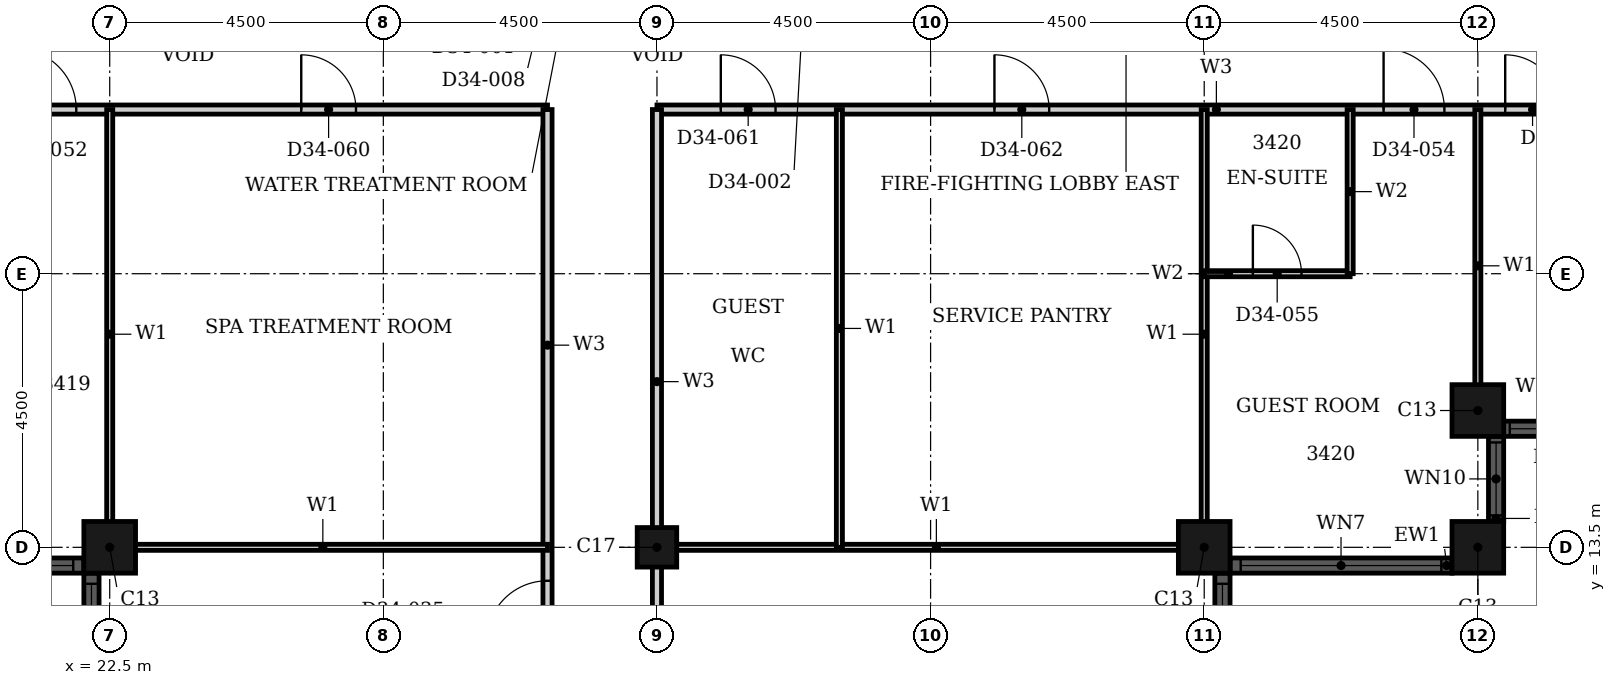
"""IFC4 building model, lengths in metres.
Left out: names, types, materials, properties, quantities, classifications, styles, units other than length and angle.
Written with IfcOpenShell. Run it as: python <this file> out.ifc"""

import sys

from ifc_helpers import new_model, si_unit, direction, frame, frame_2d, origin, origin_2d, place, context, subcontext, project, spatial, rectangle, hollow_rectangle, extrude, element, fill, save


model = new_model("IFC4")
c1 = context("Model", 3, precision=1e-05, world=origin(), true_north=direction((0.0, 1.0)))
c2 = subcontext(c1, "Body", "Model", "MODEL_VIEW")
j1 = project(units=[si_unit("LENGTHUNIT", "METRE"), si_unit("PLANEANGLEUNIT", "RADIAN")], contexts=[c1])
p1 = place(None, origin())
s1 = spatial("IfcSite", under=j1, at=p1, CompositionType="ELEMENT")
p2 = place(p1, origin())
s2 = spatial("IfcBuilding", under=s1, at=p2, CompositionType="ELEMENT")
p3 = place(p2, frame((0.0, 0.0, 136.8)))
s3 = spatial("IfcBuildingStorey", under=s2, at=p3, CompositionType="ELEMENT", Elevation=136.8)
for number, where, z_axis, x_axis in (
    (1, (40.5, 13.5, 0.0), (0.0, 0.0, 1.0), (1.0, 0.0, 0.0)),
    (2, (45.0, 13.5, 0.0), (0.0, 0.0, 1.0), (1.0, 0.0, 0.0)),
    (3, (45.0, 15.75, 0.0), (0.0, 0.0, 1.0), (1.0, 0.0, 0.0)),
    (4, (22.5, 13.5, 0.0), (0.0, 0.0, 1.0), (1.0, 0.0, 0.0)),
):
    element("IfcColumn", number, at=place(p3, frame(where, z_axis=z_axis, x_axis=x_axis)), inside=s3, PredefinedType="COLUMN", context=c2, shape_type="SweptSolid", body=[
        extrude(hollow_rectangle(XDim=0.85, YDim=0.85, WallThickness=0.026, at=origin_2d()), origin(), (0.0, 0.0, 1.0), 3.6),
    ])
p4 = place(p3, frame((31.5, 13.5, 0.0), z_axis=(0.0, 0.0, 1.0), x_axis=(1.0, 0.0, 0.0)))
e5 = element("IfcColumn", 5, at=p4, inside=s3, PredefinedType="COLUMN", context=c2, shape_type="SweptSolid", body=[
    extrude(hollow_rectangle(XDim=0.65, YDim=0.65, WallThickness=0.021, at=origin_2d()), origin(), (0.0, 0.0, 1.0), 3.6),
])
p5 = place(p3, frame((40.8, 4.925, 0.0), z_axis=(0.0, 0.0, 1.0), x_axis=(0.0, 1.0, 0.0)))
e6 = element("IfcWall", 6, at=p5, inside=s3, PredefinedType="SOLIDWALL", context=c2, shape_type="SweptSolid", body=[
    extrude(rectangle(XDim=8.15, YDim=0.25, at=frame_2d((4.075, 0.0))), origin(), (0.0, 0.0, 1.0), 3.6),
])
p6 = place(p5, frame((0.175, 0.0, 0.9)))
e7 = element("IfcOpeningElement", 7, at=p6, cuts=e6, PredefinedType="OPENING", context=c2, shape_type="SweptSolid", body=[
    extrude(rectangle(XDim=3.3, YDim=1.85, at=frame_2d((1.65, 0.925))), frame((0.0, 0.135, 0.0), z_axis=(0.0, -1.0, 0.0), x_axis=(1.0, 0.0, 0.0)), (0.0, 0.0, 1.0), 0.27),
])
p7 = place(p5, frame((4.675, 0.0, 0.9)))
e8 = element("IfcOpeningElement", 8, at=p7, cuts=e6, PredefinedType="OPENING", context=c2, shape_type="SweptSolid", body=[
    extrude(rectangle(XDim=3.3, YDim=1.85, at=frame_2d((1.65, 0.925))), frame((0.0, 0.135, 0.0), z_axis=(0.0, -1.0, 0.0), x_axis=(1.0, 0.0, 0.0)), (0.0, 0.0, 1.0), 0.27),
])
p8 = place(p3, frame((40.925, 13.2, 0.0), z_axis=(0.0, 0.0, 1.0), x_axis=(1.0, 0.0, 0.0)))
e9 = element("IfcWall", 9, at=p8, inside=s3, PredefinedType="SOLIDWALL", context=c2, shape_type="SweptSolid", body=[
    extrude(rectangle(XDim=3.65, YDim=0.25, at=frame_2d((1.825, 0.0))), origin(), (0.0, 0.0, 1.0), 3.6),
])
p9 = place(p8, frame((0.175, 0.0, 0.9)))
e10 = element("IfcOpeningElement", 10, at=p9, cuts=e9, PredefinedType="OPENING", context=c2, shape_type="SweptSolid", body=[
    extrude(rectangle(XDim=3.3, YDim=1.85, at=frame_2d((1.65, 0.925))), frame((0.0, 0.135, 0.0), z_axis=(0.0, -1.0, 0.0), x_axis=(1.0, 0.0, 0.0)), (0.0, 0.0, 1.0), 0.27),
])
p10 = place(p3, frame((45.3, 13.925, 0.0), z_axis=(0.0, 0.0, 1.0), x_axis=(0.0, 1.0, 0.0)))
e11 = element("IfcWall", 11, at=p10, inside=s3, PredefinedType="SOLIDWALL", context=c2, shape_type="SweptSolid", body=[
    extrude(rectangle(XDim=1.4, YDim=0.25, at=frame_2d((0.7, 0.0))), origin(), (0.0, 0.0, 1.0), 3.6),
])
p11 = place(p10, frame((0.1, 0.0, 0.9)))
e12 = element("IfcOpeningElement", 12, at=p11, cuts=e11, PredefinedType="OPENING", context=c2, shape_type="SweptSolid", body=[
    extrude(rectangle(XDim=1.2, YDim=1.85, at=frame_2d((0.6, 0.925))), frame((0.0, 0.135, 0.0), z_axis=(0.0, -1.0, 0.0), x_axis=(1.0, 0.0, 0.0)), (0.0, 0.0, 1.0), 0.27),
])
p12 = place(p3, frame((45.425, 15.45, 0.0), z_axis=(0.0, 0.0, 1.0), x_axis=(1.0, 0.0, 0.0)))
e13 = element("IfcWall", 13, at=p12, inside=s3, PredefinedType="SOLIDWALL", context=c2, shape_type="SweptSolid", body=[
    extrude(rectangle(XDim=1.4, YDim=0.25, at=frame_2d((0.7, 0.0))), origin(), (0.0, 0.0, 1.0), 3.6),
])
p13 = place(p12, frame((0.1, 0.0, 0.9)))
e14 = element("IfcOpeningElement", 14, at=p13, cuts=e13, PredefinedType="OPENING", context=c2, shape_type="SweptSolid", body=[
    extrude(rectangle(XDim=1.2, YDim=1.85, at=frame_2d((0.6, 0.925))), frame((0.0, 0.135, 0.0), z_axis=(0.0, -1.0, 0.0), x_axis=(1.0, 0.0, 0.0)), (0.0, 0.0, 1.0), 0.27),
])
p14 = place(p3, frame((18.425, 13.2, 0.0), z_axis=(0.0, 0.0, 1.0), x_axis=(1.0, 0.0, 0.0)))
e15 = element("IfcWall", 15, at=p14, inside=s3, PredefinedType="SOLIDWALL", context=c2, shape_type="SweptSolid", body=[
    extrude(rectangle(XDim=3.65, YDim=0.25, at=frame_2d((1.825, 0.0))), origin(), (0.0, 0.0, 1.0), 3.6),
])
p15 = place(p14, frame((0.175, 0.0, 0.9)))
e16 = element("IfcOpeningElement", 16, at=p15, cuts=e15, PredefinedType="OPENING", context=c2, shape_type="SweptSolid", body=[
    extrude(rectangle(XDim=3.3, YDim=1.85, at=frame_2d((1.65, 0.925))), frame((0.0, 0.135, 0.0), z_axis=(0.0, -1.0, 0.0), x_axis=(1.0, 0.0, 0.0)), (0.0, 0.0, 1.0), 0.27),
])
p16 = place(p3, frame((22.2, 13.075, 0.0), z_axis=(0.0, 0.0, 1.0), x_axis=(0.0, -1.0, 0.0)))
e17 = element("IfcWall", 17, at=p16, inside=s3, PredefinedType="SOLIDWALL", context=c2, shape_type="SweptSolid", body=[
    extrude(rectangle(XDim=8.15, YDim=0.25, at=frame_2d((4.075, 0.0))), origin(), (0.0, 0.0, 1.0), 3.6),
])
p17 = place(p16, frame((0.175, 0.0, 0.9)))
e18 = element("IfcOpeningElement", 18, at=p17, cuts=e17, PredefinedType="OPENING", context=c2, shape_type="SweptSolid", body=[
    extrude(rectangle(XDim=3.3, YDim=1.85, at=frame_2d((1.65, 0.925))), frame((0.0, 0.135, 0.0), z_axis=(0.0, -1.0, 0.0), x_axis=(1.0, 0.0, 0.0)), (0.0, 0.0, 1.0), 0.27),
])
p18 = place(p16, frame((4.675, 0.0, 0.9)))
e19 = element("IfcOpeningElement", 19, at=p18, cuts=e17, PredefinedType="OPENING", context=c2, shape_type="SweptSolid", body=[
    extrude(rectangle(XDim=3.3, YDim=1.85, at=frame_2d((1.65, 0.925))), frame((0.0, 0.135, 0.0), z_axis=(0.0, -1.0, 0.0), x_axis=(1.0, 0.0, 0.0)), (0.0, 0.0, 1.0), 0.27),
])
p19 = place(p3, frame((16.2, 20.7, 0.0), z_axis=(0.0, 0.0, 1.0), x_axis=(1.0, 0.0, 0.0)))
e20 = element("IfcWall", 20, at=p19, inside=s3, PredefinedType="PARTITIONING", context=c2, shape_type="SweptSolid", body=[
    extrude(rectangle(XDim=13.5, YDim=0.15, at=frame_2d((6.75, 0.0))), origin(), (0.0, 0.0, 1.0), 3.2),
])
p20 = place(p19, frame((4.75, 0.0, 0.0)))
e21 = element("IfcOpeningElement", 21, at=p20, cuts=e20, PredefinedType="OPENING", context=c2, shape_type="SweptSolid", body=[
    extrude(rectangle(XDim=1.0, YDim=2.1, at=frame_2d((0.5, 1.05))), frame((0.0, 0.085, 0.0), z_axis=(0.0, -1.0, 0.0), x_axis=(1.0, 0.0, 0.0)), (0.0, 0.0, 1.0), 0.17),
])
p21 = place(p19, frame((9.45, 0.0, 0.0)))
e22 = element("IfcOpeningElement", 22, at=p21, cuts=e20, PredefinedType="OPENING", context=c2, shape_type="SweptSolid", body=[
    extrude(rectangle(XDim=0.9, YDim=2.1, at=frame_2d((0.45, 1.05))), frame((0.0, 0.085, 0.0), z_axis=(0.0, -1.0, 0.0), x_axis=(1.0, 0.0, 0.0)), (0.0, 0.0, 1.0), 0.17),
])
p22 = place(p3, frame((31.5, 20.7, 0.0), z_axis=(0.0, 0.0, 1.0), x_axis=(1.0, 0.0, 0.0)))
e23 = element("IfcWall", 23, at=p22, inside=s3, PredefinedType="PARTITIONING", context=c2, shape_type="SweptSolid", body=[
    extrude(rectangle(XDim=15.3, YDim=0.15, at=frame_2d((7.65, 0.0))), origin(), (0.0, 0.0, 1.0), 3.2),
])
p23 = place(p22, frame((11.95, 0.0, 0.0)))
e24 = element("IfcOpeningElement", 24, at=p23, cuts=e23, PredefinedType="OPENING", context=c2, shape_type="SweptSolid", body=[
    extrude(rectangle(XDim=1.0, YDim=2.1, at=frame_2d((0.5, 1.05))), frame((0.0, 0.085, 0.0), z_axis=(0.0, -1.0, 0.0), x_axis=(1.0, 0.0, 0.0)), (0.0, 0.0, 1.0), 0.17),
])
p24 = place(p22, frame((13.95, 0.0, 0.0)))
e25 = element("IfcOpeningElement", 25, at=p24, cuts=e23, PredefinedType="OPENING", context=c2, shape_type="SweptSolid", body=[
    extrude(rectangle(XDim=0.9, YDim=2.1, at=frame_2d((0.45, 1.05))), frame((0.0, 0.085, 0.0), z_axis=(0.0, -1.0, 0.0), x_axis=(1.0, 0.0, 0.0)), (0.0, 0.0, 1.0), 0.17),
])
p25 = place(p22, frame((1.05, 0.0, 0.0)))
e26 = element("IfcOpeningElement", 26, at=p25, cuts=e23, PredefinedType="OPENING", context=c2, shape_type="SweptSolid", body=[
    extrude(rectangle(XDim=0.9, YDim=2.1, at=frame_2d((0.45, 1.05))), frame((0.0, 0.085, 0.0), z_axis=(0.0, -1.0, 0.0), x_axis=(1.0, 0.0, 0.0)), (0.0, 0.0, 1.0), 0.17),
])
p26 = place(p22, frame((5.55, 0.0, 0.0)))
e27 = element("IfcOpeningElement", 27, at=p26, cuts=e23, PredefinedType="OPENING", context=c2, shape_type="SweptSolid", body=[
    extrude(rectangle(XDim=0.9, YDim=2.1, at=frame_2d((0.45, 1.05))), frame((0.0, 0.085, 0.0), z_axis=(0.0, -1.0, 0.0), x_axis=(1.0, 0.0, 0.0)), (0.0, 0.0, 1.0), 0.17),
])
p27 = place(p3, frame((29.7, 4.5, 0.0), z_axis=(0.0, 0.0, 1.0), x_axis=(0.0, 1.0, 0.0)))
e28 = element("IfcWall", 28, at=p27, inside=s3, PredefinedType="PARTITIONING", context=c2, shape_type="SweptSolid", body=[
    extrude(rectangle(XDim=16.2, YDim=0.15, at=frame_2d((8.1, 0.0))), origin(), (0.0, 0.0, 1.0), 3.2),
])
p28 = place(p27, frame((7.45, 0.0, 0.0)))
e29 = element("IfcOpeningElement", 29, at=p28, cuts=e28, PredefinedType="OPENING", context=c2, shape_type="SweptSolid", body=[
    extrude(rectangle(XDim=1.0, YDim=2.1, at=frame_2d((0.5, 1.05))), frame((0.0, 0.085, 0.0), z_axis=(0.0, -1.0, 0.0), x_axis=(1.0, 0.0, 0.0)), (0.0, 0.0, 1.0), 0.17),
])
p29 = place(p27, frame((2.95, 0.0, 0.0)))
e30 = element("IfcOpeningElement", 30, at=p29, cuts=e28, PredefinedType="OPENING", context=c2, shape_type="SweptSolid", body=[
    extrude(rectangle(XDim=1.0, YDim=2.1, at=frame_2d((0.5, 1.05))), frame((0.0, 0.085, 0.0), z_axis=(0.0, -1.0, 0.0), x_axis=(1.0, 0.0, 0.0)), (0.0, 0.0, 1.0), 0.17),
])
p30 = place(p3, frame((31.5, 4.5, 0.0), z_axis=(0.0, 0.0, 1.0), x_axis=(0.0, 1.0, 0.0)))
e31 = element("IfcWall", 31, at=p30, inside=s3, PredefinedType="PARTITIONING", context=c2, shape_type="SweptSolid", body=[
    extrude(rectangle(XDim=16.2, YDim=0.15, at=frame_2d((8.1, 0.0))), origin(), (0.0, 0.0, 1.0), 2.48),
])
p31 = place(p30, frame((6.25, 0.0, 0.0)))
e32 = element("IfcOpeningElement", 32, at=p31, cuts=e31, PredefinedType="OPENING", context=c2, shape_type="SweptSolid", body=[
    extrude(rectangle(XDim=1.0, YDim=2.1, at=frame_2d((0.5, 1.05))), frame((0.0, 0.085, 0.0), z_axis=(0.0, -1.0, 0.0), x_axis=(1.0, 0.0, 0.0)), (0.0, 0.0, 1.0), 0.17),
])
p32 = place(p3, frame((22.31, 13.5, 0.0), z_axis=(0.0, 0.0, 1.0), x_axis=(1.0, 0.0, 0.0)))
e33 = element("IfcWall", 33, at=p32, inside=s3, PredefinedType="PARTITIONING", context=c2, shape_type="SweptSolid", body=[
    extrude(rectangle(XDim=7.39, YDim=0.1, at=frame_2d((3.695, 0.0))), origin(), (0.0, 0.0, 1.0), 2.28),
])
p33 = place(p3, frame((31.5, 13.5, 0.0), z_axis=(0.0, 0.0, 1.0), x_axis=(1.0, 0.0, 0.0)))
e34 = element("IfcWall", 34, at=p33, inside=s3, PredefinedType="PARTITIONING", context=c2, shape_type="SweptSolid", body=[
    extrude(rectangle(XDim=9.19, YDim=0.1, at=frame_2d((4.595, 0.0))), origin(), (0.0, 0.0, 1.0), 2.28),
])
p34 = place(p3, frame((22.5, 13.31, 0.0), z_axis=(0.0, 0.0, 1.0), x_axis=(0.0, 1.0, 0.0)))
e35 = element("IfcWall", 35, at=p34, inside=s3, PredefinedType="PARTITIONING", context=c2, shape_type="SweptSolid", body=[
    extrude(rectangle(XDim=7.39, YDim=0.1, at=frame_2d((3.695, 0.0))), origin(), (0.0, 0.0, 1.0), 3.2),
])
p35 = place(p3, frame((34.5, 13.5, 0.0), z_axis=(0.0, 0.0, 1.0), x_axis=(0.0, 1.0, 0.0)))
e36 = element("IfcWall", 36, at=p35, inside=s3, PredefinedType="PARTITIONING", context=c2, shape_type="SweptSolid", body=[
    extrude(rectangle(XDim=7.2, YDim=0.1, at=frame_2d((3.6, 0.0))), origin(), (0.0, 0.0, 1.0), 3.2),
])
p36 = place(p3, frame((40.5, 13.31, 0.0), z_axis=(0.0, 0.0, 1.0), x_axis=(0.0, 1.0, 0.0)))
e37 = element("IfcWall", 37, at=p36, inside=s3, PredefinedType="PARTITIONING", context=c2, shape_type="SweptSolid", body=[
    extrude(rectangle(XDim=7.39, YDim=0.1, at=frame_2d((3.695, 0.0))), origin(), (0.0, 0.0, 1.0), 3.2),
])
p37 = place(p3, frame((45.0, 15.56, 0.0), z_axis=(0.0, 0.0, 1.0), x_axis=(0.0, 1.0, 0.0)))
e38 = element("IfcWall", 38, at=p37, inside=s3, PredefinedType="PARTITIONING", context=c2, shape_type="SweptSolid", body=[
    extrude(rectangle(XDim=5.14, YDim=0.1, at=frame_2d((2.57, 0.0))), origin(), (0.0, 0.0, 1.0), 3.2),
])
p38 = place(p3, frame((40.5, 18.0, 0.0), z_axis=(0.0, 0.0, 1.0), x_axis=(1.0, 0.0, 0.0)))
e39 = element("IfcWall", 39, at=p38, inside=s3, PredefinedType="PARTITIONING", context=c2, shape_type="SweptSolid", body=[
    extrude(rectangle(XDim=2.4, YDim=0.1, at=frame_2d((1.2, 0.0))), origin(), (0.0, 0.0, 1.0), 3.2),
])
p39 = place(p38, frame((0.8, 0.0, 0.0)))
e40 = element("IfcOpeningElement", 40, at=p39, cuts=e39, PredefinedType="OPENING", context=c2, shape_type="SweptSolid", body=[
    extrude(rectangle(XDim=0.8, YDim=2.1, at=frame_2d((0.4, 1.05))), frame((0.0, 0.06, 0.0), z_axis=(0.0, -1.0, 0.0), x_axis=(1.0, 0.0, 0.0)), (0.0, 0.0, 1.0), 0.12),
])
p40 = place(p3, frame((42.9, 18.0, 0.0), z_axis=(0.0, 0.0, 1.0), x_axis=(0.0, 1.0, 0.0)))
e41 = element("IfcWall", 41, at=p40, inside=s3, PredefinedType="PARTITIONING", context=c2, shape_type="SweptSolid", body=[
    extrude(rectangle(XDim=2.7, YDim=0.1, at=frame_2d((1.35, 0.0))), origin(), (0.0, 0.0, 1.0), 3.2),
])
p41 = place(p7, origin())
e42 = element("IfcWindow", 42, at=p41, inside=s3, PartitioningType="SINGLE_PANEL", PredefinedType="WINDOW", context=c2, shape_type="SweptSolid", body=[
    extrude(rectangle(XDim=3.3, YDim=1.85, at=frame_2d((1.65, 0.925))), frame((0.0, 0.03, 0.0), z_axis=(0.0, -1.0, 0.0), x_axis=(1.0, 0.0, 0.0)), (0.0, 0.0, 1.0), 0.06),
])
fill(e8, e42)
p42 = place(p9, origin())
e43 = element("IfcWindow", 43, at=p42, inside=s3, PartitioningType="SINGLE_PANEL", PredefinedType="WINDOW", context=c2, shape_type="SweptSolid", body=[
    extrude(rectangle(XDim=3.3, YDim=1.85, at=frame_2d((1.65, 0.925))), frame((0.0, 0.03, 0.0), z_axis=(0.0, -1.0, 0.0), x_axis=(1.0, 0.0, 0.0)), (0.0, 0.0, 1.0), 0.06),
])
fill(e10, e43)
p43 = place(p11, origin())
e44 = element("IfcWindow", 44, at=p43, inside=s3, PartitioningType="SINGLE_PANEL", PredefinedType="WINDOW", context=c2, shape_type="SweptSolid", body=[
    extrude(rectangle(XDim=1.2, YDim=1.85, at=frame_2d((0.6, 0.925))), frame((0.0, 0.03, 0.0), z_axis=(0.0, -1.0, 0.0), x_axis=(1.0, 0.0, 0.0)), (0.0, 0.0, 1.0), 0.06),
])
fill(e12, e44)
p44 = place(p13, origin())
e45 = element("IfcWindow", 45, at=p44, inside=s3, PartitioningType="SINGLE_PANEL", PredefinedType="WINDOW", context=c2, shape_type="SweptSolid", body=[
    extrude(rectangle(XDim=1.2, YDim=1.85, at=frame_2d((0.6, 0.925))), frame((0.0, 0.03, 0.0), z_axis=(0.0, -1.0, 0.0), x_axis=(1.0, 0.0, 0.0)), (0.0, 0.0, 1.0), 0.06),
])
fill(e14, e45)
p45 = place(p15, origin())
e46 = element("IfcWindow", 46, at=p45, inside=s3, PartitioningType="SINGLE_PANEL", PredefinedType="WINDOW", context=c2, shape_type="SweptSolid", body=[
    extrude(rectangle(XDim=3.3, YDim=1.85, at=frame_2d((1.65, 0.925))), frame((0.0, 0.03, 0.0), z_axis=(0.0, -1.0, 0.0), x_axis=(1.0, 0.0, 0.0)), (0.0, 0.0, 1.0), 0.06),
])
fill(e16, e46)
p46 = place(p17, origin())
e47 = element("IfcWindow", 47, at=p46, inside=s3, PartitioningType="SINGLE_PANEL", PredefinedType="WINDOW", context=c2, shape_type="SweptSolid", body=[
    extrude(rectangle(XDim=3.3, YDim=1.85, at=frame_2d((1.65, 0.925))), frame((0.0, 0.03, 0.0), z_axis=(0.0, -1.0, 0.0), x_axis=(1.0, 0.0, 0.0)), (0.0, 0.0, 1.0), 0.06),
])
fill(e18, e47)
p47 = place(p28, origin())
e48 = element("IfcDoor", 48, at=p47, inside=s3, OperationType="SINGLE_SWING_RIGHT", PredefinedType="DOOR", context=c2, shape_type="SweptSolid", body=[
    extrude(rectangle(XDim=1.0, YDim=2.1, at=frame_2d((0.5, 1.05))), frame((0.0, 0.025, 0.0), z_axis=(0.0, -1.0, 0.0), x_axis=(1.0, 0.0, 0.0)), (0.0, 0.0, 1.0), 0.05),
])
fill(e29, e48)
p48 = place(p20, origin())
e49 = element("IfcDoor", 49, at=p48, inside=s3, OperationType="SINGLE_SWING_RIGHT", PredefinedType="DOOR", context=c2, shape_type="SweptSolid", body=[
    extrude(rectangle(XDim=1.0, YDim=2.1, at=frame_2d((0.5, 1.05))), frame((0.0, 0.025, 0.0), z_axis=(0.0, -1.0, 0.0), x_axis=(1.0, 0.0, 0.0)), (0.0, 0.0, 1.0), 0.05),
])
fill(e21, e49)
p49 = place(p23, origin())
e50 = element("IfcDoor", 50, at=p49, inside=s3, OperationType="SINGLE_SWING_RIGHT", PredefinedType="DOOR", context=c2, shape_type="SweptSolid", body=[
    extrude(rectangle(XDim=1.0, YDim=2.1, at=frame_2d((0.5, 1.05))), frame((0.0, 0.025, 0.0), z_axis=(0.0, -1.0, 0.0), x_axis=(1.0, 0.0, 0.0)), (0.0, 0.0, 1.0), 0.05),
])
fill(e24, e50)
p50 = place(p39, origin())
e51 = element("IfcDoor", 51, at=p50, inside=s3, OperationType="SINGLE_SWING_LEFT", PredefinedType="DOOR", context=c2, shape_type="SweptSolid", body=[
    extrude(rectangle(XDim=0.8, YDim=2.1, at=frame_2d((0.4, 1.05))), frame((0.0, 0.025, 0.0), z_axis=(0.0, -1.0, 0.0), x_axis=(1.0, 0.0, 0.0)), (0.0, 0.0, 1.0), 0.05),
])
fill(e40, e51)
p51 = place(p24, origin())
e52 = element("IfcDoor", 52, at=p51, inside=s3, OperationType="SINGLE_SWING_LEFT", PredefinedType="DOOR", context=c2, shape_type="SweptSolid", body=[
    extrude(rectangle(XDim=0.9, YDim=2.1, at=frame_2d((0.45, 1.05))), frame((0.0, 0.025, 0.0), z_axis=(0.0, -1.0, 0.0), x_axis=(1.0, 0.0, 0.0)), (0.0, 0.0, 1.0), 0.05),
])
fill(e25, e52)
p52 = place(p21, origin())
e53 = element("IfcDoor", 53, at=p52, inside=s3, OperationType="SINGLE_SWING_RIGHT", PredefinedType="DOOR", context=c2, shape_type="SweptSolid", body=[
    extrude(rectangle(XDim=0.9, YDim=2.1, at=frame_2d((0.45, 1.05))), frame((0.0, 0.025, 0.0), z_axis=(0.0, -1.0, 0.0), x_axis=(1.0, 0.0, 0.0)), (0.0, 0.0, 1.0), 0.05),
])
fill(e22, e53)
p53 = place(p25, origin())
e54 = element("IfcDoor", 54, at=p53, inside=s3, OperationType="SINGLE_SWING_RIGHT", PredefinedType="DOOR", context=c2, shape_type="SweptSolid", body=[
    extrude(rectangle(XDim=0.9, YDim=2.1, at=frame_2d((0.45, 1.05))), frame((0.0, 0.025, 0.0), z_axis=(0.0, -1.0, 0.0), x_axis=(1.0, 0.0, 0.0)), (0.0, 0.0, 1.0), 0.05),
])
fill(e26, e54)
p54 = place(p26, origin())
e55 = element("IfcDoor", 55, at=p54, inside=s3, OperationType="SINGLE_SWING_RIGHT", PredefinedType="DOOR", context=c2, shape_type="SweptSolid", body=[
    extrude(rectangle(XDim=0.9, YDim=2.1, at=frame_2d((0.45, 1.05))), frame((0.0, 0.025, 0.0), z_axis=(0.0, -1.0, 0.0), x_axis=(1.0, 0.0, 0.0)), (0.0, 0.0, 1.0), 0.05),
])
fill(e27, e55)
save(model, sys.argv[1])
